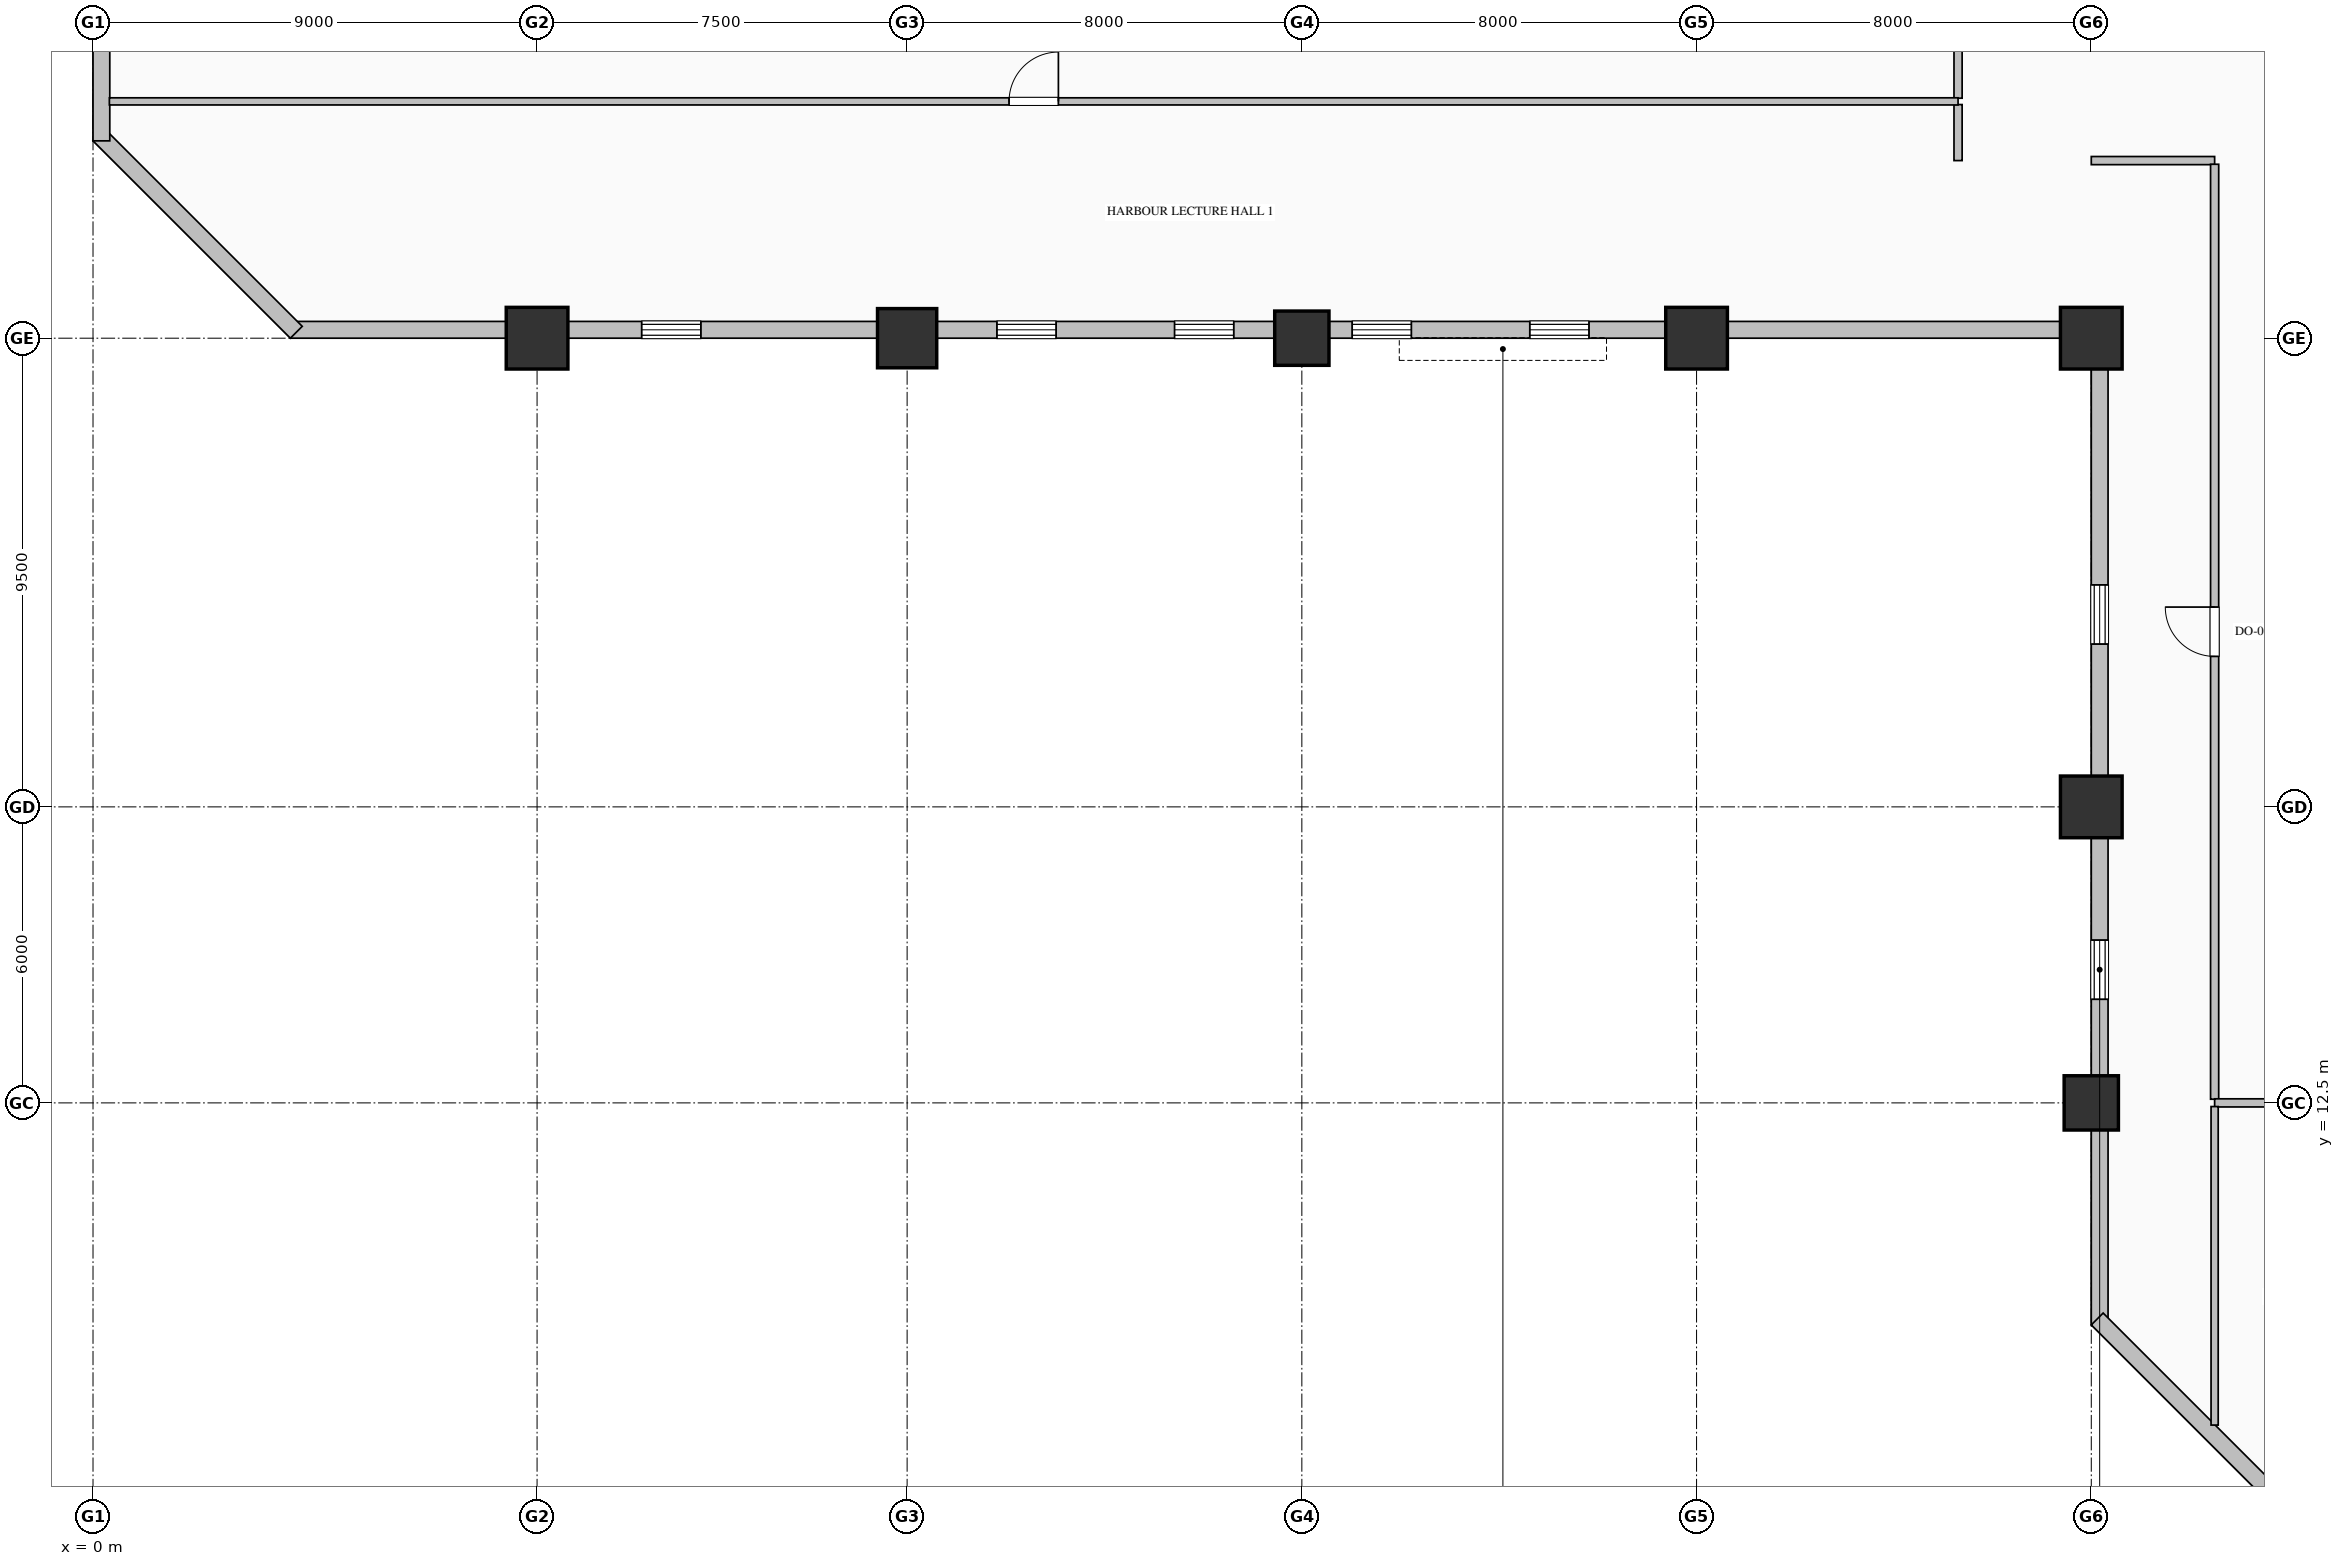
"""IFC4 building model, lengths in metres.
Left out: names, types, materials, properties, quantities, classifications, styles, units other than length and angle.
Written with IfcOpenShell. Run it as: python <this file> out.ifc"""

import sys

from ifc_helpers import new_model, si_unit, direction, frame, frame_2d, origin, origin_2d, place, context, subcontext, project, spatial, rectangle, hollow_rectangle, hollow_circle, extrude, element, fill, save


model = new_model("IFC4")
c1 = context("Model", 3, precision=1e-05, world=origin(), true_north=direction((0.0, 1.0)))
c2 = subcontext(c1, "Body", "Model", "MODEL_VIEW")
j1 = project(units=[si_unit("LENGTHUNIT", "METRE"), si_unit("PLANEANGLEUNIT", "RADIAN")], contexts=[c1])
p1 = place(None, origin())
s1 = spatial("IfcSite", under=j1, at=p1, CompositionType="ELEMENT")
p2 = place(p1, origin())
s2 = spatial("IfcBuilding", under=s1, at=p2, CompositionType="ELEMENT")
p3 = place(p2, frame((0.0, 0.0, 52.2)))
s3 = spatial("IfcBuildingStorey", under=s2, at=p3, CompositionType="ELEMENT", Elevation=52.2)
p4 = place(p3, frame((9.0, 28.0, 0.0), z_axis=(0.0, 0.0, 1.0), x_axis=(1.0, 0.0, 0.0)))
e1 = element("IfcColumn", 1, at=p4, inside=s3, PredefinedType="COLUMN", context=c2, shape_type="SweptSolid", body=[
    extrude(hollow_rectangle(XDim=1.25, YDim=1.25, WallThickness=0.045, at=origin_2d()), origin(), (0.0, 0.0, 1.0), 4.0),
])
p5 = place(p3, frame((16.5, 28.0, 0.0), z_axis=(0.0, 0.0, 1.0), x_axis=(1.0, 0.0, 0.0)))
e2 = element("IfcColumn", 2, at=p5, inside=s3, PredefinedType="COLUMN", context=c2, shape_type="SweptSolid", body=[
    extrude(hollow_circle(Radius=0.6, WallThickness=0.04, at=origin_2d()), origin(), (0.0, 0.0, 1.0), 4.0),
])
p6 = place(p3, frame((24.5, 28.0, 0.0), z_axis=(0.0, 0.0, 1.0), x_axis=(1.0, 0.0, 0.0)))
e3 = element("IfcColumn", 3, at=p6, inside=s3, PredefinedType="COLUMN", context=c2, shape_type="SweptSolid", body=[
    extrude(hollow_rectangle(XDim=1.1, YDim=1.1, WallThickness=0.04, at=origin_2d()), origin(), (0.0, 0.0, 1.0), 4.0),
])
p7 = place(p3, frame((32.5, 28.0, 0.0), z_axis=(0.0, 0.0, 1.0), x_axis=(1.0, 0.0, 0.0)))
e4 = element("IfcColumn", 4, at=p7, inside=s3, PredefinedType="COLUMN", context=c2, shape_type="SweptSolid", body=[
    extrude(hollow_rectangle(XDim=1.25, YDim=1.25, WallThickness=0.045, at=origin_2d()), origin(), (0.0, 0.0, 1.0), 4.0),
])
p8 = place(p3, frame((40.5, 12.5, 0.0), z_axis=(0.0, 0.0, 1.0), x_axis=(1.0, 0.0, 0.0)))
e5 = element("IfcColumn", 5, at=p8, inside=s3, PredefinedType="COLUMN", context=c2, shape_type="SweptSolid", body=[
    extrude(hollow_rectangle(XDim=1.1, YDim=1.1, WallThickness=0.04, at=origin_2d()), origin(), (0.0, 0.0, 1.0), 4.0),
])
for number, where, z_axis, x_axis in (
    (6, (40.5, 18.5, 0.0), (0.0, 0.0, 1.0), (1.0, 0.0, 0.0)),
    (7, (40.5, 28.0, 0.0), (0.0, 0.0, 1.0), (1.0, 0.0, 0.0)),
):
    element("IfcColumn", number, at=place(p3, frame(where, z_axis=z_axis, x_axis=x_axis)), inside=s3, PredefinedType="COLUMN", context=c2, shape_type="SweptSolid", body=[
        extrude(hollow_rectangle(XDim=1.25, YDim=1.25, WallThickness=0.045, at=origin_2d()), origin(), (0.0, 0.0, 1.0), 4.0),
    ])
p9 = place(p3, frame((40.67, 8.0, 0.0), z_axis=(0.0, 0.0, 1.0), x_axis=(0.0, 1.0, 0.0)))
e8 = element("IfcWall", 8, at=p9, inside=s3, PredefinedType="SOLIDWALL", context=c2, shape_type="SweptSolid", body=[
    extrude(rectangle(XDim=20.34, YDim=0.34, at=frame_2d((10.17, 0.0))), origin(), (0.0, 0.0, 1.0), 3.05),
])
p10 = place(p9, frame((6.6, 0.0, 0.7)))
e9 = element("IfcOpeningElement", 9, at=p10, cuts=e8, PredefinedType="OPENING", context=c2, shape_type="SweptSolid", body=[
    extrude(rectangle(XDim=1.2, YDim=1.85, at=frame_2d((0.6, 0.925))), frame((0.0, 0.18, 0.0), z_axis=(0.0, -1.0, 0.0), x_axis=(1.0, 0.0, 0.0)), (0.0, 0.0, 1.0), 0.36),
])
p11 = place(p9, frame((13.8, 0.0, 0.7)))
e10 = element("IfcOpeningElement", 10, at=p11, cuts=e8, PredefinedType="OPENING", context=c2, shape_type="SweptSolid", body=[
    extrude(rectangle(XDim=1.2, YDim=1.85, at=frame_2d((0.6, 0.925))), frame((0.0, 0.18, 0.0), z_axis=(0.0, -1.0, 0.0), x_axis=(1.0, 0.0, 0.0)), (0.0, 0.0, 1.0), 0.36),
])
p12 = place(p3, frame((40.52, 28.17, 0.0), z_axis=(0.0, 0.0, 1.0), x_axis=(-1.0, 0.0, 0.0)))
e11 = element("IfcWall", 11, at=p12, inside=s3, PredefinedType="SOLIDWALL", context=c2, shape_type="SweptSolid", body=[
    extrude(rectangle(XDim=36.52, YDim=0.34, at=frame_2d((18.26, 0.0))), origin(), (0.0, 0.0, 1.0), 3.05),
])
p13 = place(p12, frame((10.2, 0.0, 0.7)))
e12 = element("IfcOpeningElement", 12, at=p13, cuts=e11, PredefinedType="OPENING", context=c2, shape_type="SweptSolid", body=[
    extrude(rectangle(XDim=1.2, YDim=1.85, at=frame_2d((0.6, 0.925))), frame((0.0, 0.18, 0.0), z_axis=(0.0, -1.0, 0.0), x_axis=(1.0, 0.0, 0.0)), (0.0, 0.0, 1.0), 0.36),
])
p14 = place(p12, frame((13.8, 0.0, 0.7)))
e13 = element("IfcOpeningElement", 13, at=p14, cuts=e11, PredefinedType="OPENING", context=c2, shape_type="SweptSolid", body=[
    extrude(rectangle(XDim=1.2, YDim=1.85, at=frame_2d((0.6, 0.925))), frame((0.0, 0.18, 0.0), z_axis=(0.0, -1.0, 0.0), x_axis=(1.0, 0.0, 0.0)), (0.0, 0.0, 1.0), 0.36),
])
p15 = place(p12, frame((17.4, 0.0, 0.7)))
e14 = element("IfcOpeningElement", 14, at=p15, cuts=e11, PredefinedType="OPENING", context=c2, shape_type="SweptSolid", body=[
    extrude(rectangle(XDim=1.2, YDim=1.85, at=frame_2d((0.6, 0.925))), frame((0.0, 0.18, 0.0), z_axis=(0.0, -1.0, 0.0), x_axis=(1.0, 0.0, 0.0)), (0.0, 0.0, 1.0), 0.36),
])
p16 = place(p12, frame((21.0, 0.0, 0.7)))
e15 = element("IfcOpeningElement", 15, at=p16, cuts=e11, PredefinedType="OPENING", context=c2, shape_type="SweptSolid", body=[
    extrude(rectangle(XDim=1.2, YDim=1.85, at=frame_2d((0.6, 0.925))), frame((0.0, 0.18, 0.0), z_axis=(0.0, -1.0, 0.0), x_axis=(1.0, 0.0, 0.0)), (0.0, 0.0, 1.0), 0.36),
])
p17 = place(p12, frame((28.2, 0.0, 0.7)))
e16 = element("IfcOpeningElement", 16, at=p17, cuts=e11, PredefinedType="OPENING", context=c2, shape_type="SweptSolid", body=[
    extrude(rectangle(XDim=1.2, YDim=1.85, at=frame_2d((0.6, 0.925))), frame((0.0, 0.18, 0.0), z_axis=(0.0, -1.0, 0.0), x_axis=(1.0, 0.0, 0.0)), (0.0, 0.0, 1.0), 0.36),
])
p18 = place(p3, frame((4.12, 28.12, 0.0), z_axis=(0.0, 0.0, 1.0), x_axis=(-0.707106781187, 0.707106781187, 0.0)))
e17 = element("IfcWall", 17, at=p18, inside=s3, PredefinedType="SOLIDWALL", context=c2, shape_type="SweptSolid", body=[
    extrude(rectangle(XDim=5.657, YDim=0.34, at=frame_2d((2.828, 0.0))), origin(), (0.0, 0.0, 1.0), 3.75),
])
p19 = place(p3, frame((0.17, 32.0, 0.0), z_axis=(0.0, 0.0, 1.0), x_axis=(0.0, 1.0, 0.0)))
e18 = element("IfcWall", 18, at=p19, inside=s3, PredefinedType="SOLIDWALL", context=c2, shape_type="SweptSolid", body=[
    extrude(rectangle(XDim=16.0, YDim=0.34, at=frame_2d((8.0, 0.0))), origin(), (0.0, 0.0, 1.0), 3.25),
])
p20 = place(p3, frame((44.62, 4.12, 0.0), z_axis=(0.0, 0.0, 1.0), x_axis=(-0.707106781187, 0.707106781187, 0.0)))
e19 = element("IfcWall", 19, at=p20, inside=s3, PredefinedType="SOLIDWALL", context=c2, shape_type="SweptSolid", body=[
    extrude(rectangle(XDim=5.657, YDim=0.34, at=frame_2d((2.828, 0.0))), origin(), (0.0, 0.0, 1.0), 3.75),
])
p21 = place(p3, frame((37.8, 31.6, 0.0), z_axis=(0.0, 0.0, 1.0), x_axis=(0.0, 1.0, 0.0)))
e20 = element("IfcWall", 20, at=p21, inside=s3, PredefinedType="PARTITIONING", context=c2, shape_type="SweptSolid", body=[
    extrude(rectangle(XDim=1.135, YDim=0.165, at=frame_2d((0.568, 0.0))), origin(), (0.0, 0.0, 1.0), 3.75),
])
p22 = place(p3, frame((37.8, 32.865, 0.0), z_axis=(0.0, 0.0, 1.0), x_axis=(0.0, 1.0, 0.0)))
e21 = element("IfcWall", 21, at=p22, inside=s3, PredefinedType="PARTITIONING", context=c2, shape_type="SweptSolid", body=[
    extrude(rectangle(XDim=3.079, YDim=0.165, at=frame_2d((1.539, 0.0))), origin(), (0.0, 0.0, 1.0), 3.75),
])
p23 = place(p22, frame((1.039, 0.0, 0.0)))
e22 = element("IfcOpeningElement", 22, at=p23, cuts=e21, PredefinedType="OPENING", context=c2, shape_type="SweptSolid", body=[
    extrude(rectangle(XDim=1.0, YDim=2.15, at=frame_2d((0.5, 1.075))), frame((0.0, 0.093, 0.0), z_axis=(0.0, -1.0, 0.0), x_axis=(1.0, 0.0, 0.0)), (0.0, 0.0, 1.0), 0.185),
])
p24 = place(p3, frame((43.0, 31.6, 0.0), z_axis=(0.0, 0.0, 1.0), x_axis=(-1.0, 0.0, 0.0)))
e23 = element("IfcWall", 23, at=p24, inside=s3, PredefinedType="PARTITIONING", context=c2, shape_type="SweptSolid", body=[
    extrude(rectangle(XDim=2.5, YDim=0.165, at=frame_2d((1.25, 0.0))), origin(), (0.0, 0.0, 1.0), 3.75),
])
p25 = place(p3, frame((43.0, 12.574, 0.0), z_axis=(0.0, 0.0, 1.0), x_axis=(0.0, 1.0, 0.0)))
e24 = element("IfcWall", 24, at=p25, inside=s3, PredefinedType="PARTITIONING", context=c2, shape_type="SweptSolid", body=[
    extrude(rectangle(XDim=18.951, YDim=0.165, at=frame_2d((9.476, 0.0))), origin(), (0.0, 0.0, 1.0), 3.75),
])
p26 = place(p25, frame((8.976, 0.0, 0.0)))
e25 = element("IfcOpeningElement", 25, at=p26, cuts=e24, PredefinedType="OPENING", context=c2, shape_type="SweptSolid", body=[
    extrude(rectangle(XDim=1.0, YDim=2.15, at=frame_2d((0.5, 1.075))), frame((0.0, 0.093, 0.0), z_axis=(0.0, -1.0, 0.0), x_axis=(1.0, 0.0, 0.0)), (0.0, 0.0, 1.0), 0.185),
])
p27 = place(p3, frame((45.2, 12.5, 0.0), z_axis=(0.0, 0.0, 1.0), x_axis=(-1.0, 0.0, 0.0)))
e26 = element("IfcWall", 26, at=p27, inside=s3, PredefinedType="PARTITIONING", context=c2, shape_type="SweptSolid", body=[
    extrude(rectangle(XDim=2.2, YDim=0.165, at=frame_2d((1.1, 0.0))), origin(), (0.0, 0.0, 1.0), 3.042),
])
p28 = place(p3, frame((43.0, 12.426, 0.0), z_axis=(0.0, 0.0, 1.0), x_axis=(0.0, -1.0, 0.0)))
e27 = element("IfcWall", 27, at=p28, inside=s3, PredefinedType="PARTITIONING", context=c2, shape_type="SweptSolid", body=[
    extrude(rectangle(XDim=6.456, YDim=0.145, at=frame_2d((3.228, 0.0))), origin(), (0.0, 0.0, 1.0), 3.75),
])
p29 = place(p3, frame((0.332, 32.8, 0.0), z_axis=(0.0, 0.0, 1.0), x_axis=(1.0, 0.0, 0.0)))
e28 = element("IfcWall", 28, at=p29, inside=s3, PredefinedType="PARTITIONING", context=c2, shape_type="SweptSolid", body=[
    extrude(rectangle(XDim=37.468, YDim=0.145, at=frame_2d((18.734, 0.0))), origin(), (0.0, 0.0, 1.0), 3.75),
])
p30 = place(p29, frame((18.234, 0.0, 0.0)))
e29 = element("IfcOpeningElement", 29, at=p30, cuts=e28, PredefinedType="OPENING", context=c2, shape_type="SweptSolid", body=[
    extrude(rectangle(XDim=1.0, YDim=2.15, at=frame_2d((0.5, 1.075))), frame((0.0, 0.083, 0.0), z_axis=(0.0, -1.0, 0.0), x_axis=(1.0, 0.0, 0.0)), (0.0, 0.0, 1.0), 0.165),
])
p31 = place(p10, origin())
e30 = element("IfcWindow", 30, at=p31, inside=s3, PartitioningType="DOUBLE_PANEL_VERTICAL", PredefinedType="WINDOW", context=c2, shape_type="SweptSolid", body=[
    extrude(rectangle(XDim=1.2, YDim=1.85, at=frame_2d((0.6, 0.925))), frame((0.0, 0.15, 0.0), z_axis=(0.0, -1.0, 0.0), x_axis=(1.0, 0.0, 0.0)), (0.0, 0.0, 1.0), 0.06),
])
fill(e9, e30)
p32 = place(p11, origin())
e31 = element("IfcWindow", 31, at=p32, inside=s3, PartitioningType="DOUBLE_PANEL_VERTICAL", PredefinedType="WINDOW", context=c2, shape_type="SweptSolid", body=[
    extrude(rectangle(XDim=1.2, YDim=1.85, at=frame_2d((0.6, 0.925))), frame((0.0, 0.15, 0.0), z_axis=(0.0, -1.0, 0.0), x_axis=(1.0, 0.0, 0.0)), (0.0, 0.0, 1.0), 0.06),
])
fill(e10, e31)
p33 = place(p13, origin())
e32 = element("IfcWindow", 32, at=p33, inside=s3, PartitioningType="DOUBLE_PANEL_VERTICAL", PredefinedType="WINDOW", context=c2, shape_type="SweptSolid", body=[
    extrude(rectangle(XDim=1.2, YDim=1.85, at=frame_2d((0.6, 0.925))), frame((0.0, 0.15, 0.0), z_axis=(0.0, -1.0, 0.0), x_axis=(1.0, 0.0, 0.0)), (0.0, 0.0, 1.0), 0.06),
])
fill(e12, e32)
p34 = place(p14, origin())
e33 = element("IfcWindow", 33, at=p34, inside=s3, PartitioningType="DOUBLE_PANEL_VERTICAL", PredefinedType="WINDOW", context=c2, shape_type="SweptSolid", body=[
    extrude(rectangle(XDim=1.2, YDim=1.85, at=frame_2d((0.6, 0.925))), frame((0.0, 0.15, 0.0), z_axis=(0.0, -1.0, 0.0), x_axis=(1.0, 0.0, 0.0)), (0.0, 0.0, 1.0), 0.06),
])
fill(e13, e33)
p35 = place(p15, origin())
e34 = element("IfcWindow", 34, at=p35, inside=s3, PartitioningType="DOUBLE_PANEL_VERTICAL", PredefinedType="WINDOW", context=c2, shape_type="SweptSolid", body=[
    extrude(rectangle(XDim=1.2, YDim=1.85, at=frame_2d((0.6, 0.925))), frame((0.0, 0.15, 0.0), z_axis=(0.0, -1.0, 0.0), x_axis=(1.0, 0.0, 0.0)), (0.0, 0.0, 1.0), 0.06),
])
fill(e14, e34)
p36 = place(p16, origin())
e35 = element("IfcWindow", 35, at=p36, inside=s3, PartitioningType="DOUBLE_PANEL_VERTICAL", PredefinedType="WINDOW", context=c2, shape_type="SweptSolid", body=[
    extrude(rectangle(XDim=1.2, YDim=1.85, at=frame_2d((0.6, 0.925))), frame((0.0, 0.15, 0.0), z_axis=(0.0, -1.0, 0.0), x_axis=(1.0, 0.0, 0.0)), (0.0, 0.0, 1.0), 0.06),
])
fill(e15, e35)
p37 = place(p17, origin())
e36 = element("IfcWindow", 36, at=p37, inside=s3, PartitioningType="DOUBLE_PANEL_VERTICAL", PredefinedType="WINDOW", context=c2, shape_type="SweptSolid", body=[
    extrude(rectangle(XDim=1.2, YDim=1.85, at=frame_2d((0.6, 0.925))), frame((0.0, 0.15, 0.0), z_axis=(0.0, -1.0, 0.0), x_axis=(1.0, 0.0, 0.0)), (0.0, 0.0, 1.0), 0.06),
])
fill(e16, e36)
p38 = place(p26, origin())
e37 = element("IfcDoor", 37, at=p38, inside=s3, OperationType="SINGLE_SWING_RIGHT", PredefinedType="DOOR", context=c2, shape_type="SweptSolid", body=[
    extrude(rectangle(XDim=1.0, YDim=2.15, at=frame_2d((0.5, 1.075))), frame((0.0, 0.025, 0.0), z_axis=(0.0, -1.0, 0.0), x_axis=(1.0, 0.0, 0.0)), (0.0, 0.0, 1.0), 0.05),
])
fill(e25, e37)
p39 = place(p30, origin())
e38 = element("IfcDoor", 38, at=p39, inside=s3, OperationType="SINGLE_SWING_RIGHT", PredefinedType="DOOR", context=c2, shape_type="SweptSolid", body=[
    extrude(rectangle(XDim=1.0, YDim=2.15, at=frame_2d((0.5, 1.075))), frame((0.0, 0.025, 0.0), z_axis=(0.0, -1.0, 0.0), x_axis=(1.0, 0.0, 0.0)), (0.0, 0.0, 1.0), 0.05),
])
fill(e29, e38)
save(model, sys.argv[1])
